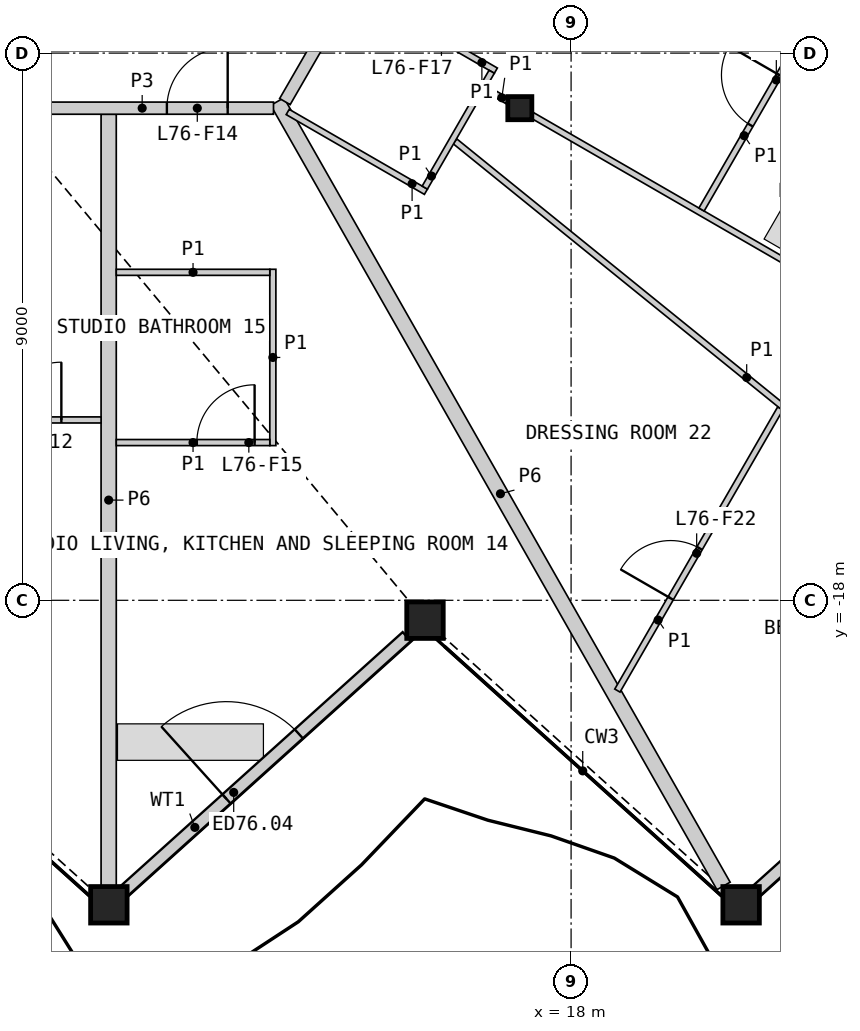
"""IFC4 building model, lengths in metres.
Left out: names, types, materials, properties, quantities, classifications, styles, units other than length and angle.
Written with IfcOpenShell. Run it as: python <this file> out.ifc"""

import sys

from ifc_helpers import new_model, si_unit, direction, frame, frame_2d, origin, origin_2d, place, context, subcontext, project, spatial, rectangle, hollow_rectangle, i_section, extrude, element, fill, save


model = new_model("IFC4")
c1 = context("Model", 3, precision=1e-05, world=origin(), true_north=direction((0.0, 1.0)))
c2 = subcontext(c1, "Body", "Model", "MODEL_VIEW")
j1 = project(units=[si_unit("LENGTHUNIT", "METRE"), si_unit("PLANEANGLEUNIT", "RADIAN")], contexts=[c1])
p1 = place(None, origin())
s1 = spatial("IfcSite", under=j1, at=p1, CompositionType="ELEMENT")
p2 = place(p1, origin())
s2 = spatial("IfcBuilding", under=s1, at=p2, CompositionType="ELEMENT")
p3 = place(p2, frame((0.0, 0.0, 339.2)))
s3 = spatial("IfcBuildingStorey", under=s2, at=p3, CompositionType="ELEMENT", Elevation=339.2)
for number, where, z_axis, x_axis in (
    (1, (10.398, -23.008, 0.0), (0.0, 0.0, 1.0), (1.0, 0.0, 0.0)),
    (2, (15.597, -18.327, 0.0), (0.0, 0.0, 1.0), (1.0, 0.0, 0.0)),
    (3, (20.796, -23.008, 0.0), (0.0, 0.0, 1.0), (1.0, 0.0, 0.0)),
):
    element("IfcColumn", number, at=place(p3, frame(where, z_axis=z_axis, x_axis=x_axis)), inside=s3, PredefinedType="COLUMN", context=c2, shape_type="SweptSolid", body=[
        extrude(hollow_rectangle(XDim=0.6, YDim=0.6, WallThickness=0.04, at=origin_2d()), origin(), (0.0, 0.0, 1.0), 3.4),
    ])
p4 = place(p3, frame((17.157, -9.906, 0.0), z_axis=(0.0, 0.0, 1.0), x_axis=(1.0, 0.0, 0.0)))
e4 = element("IfcColumn", 4, at=p4, inside=s3, PredefinedType="COLUMN", context=c2, shape_type="SweptSolid", body=[
    extrude(i_section(OverallWidth=0.396, OverallDepth=0.381, WebThickness=0.019, FlangeThickness=0.03, at=origin_2d()), origin(), (0.0, 0.0, 1.0), 3.4),
])
p5 = place(p3, frame((10.651, -22.781, 0.0), z_axis=(0.0, 0.0, 1.0), x_axis=(0.743154335217, 0.669120044572, 0.0)))
e5 = element("IfcWall", 5, at=p5, inside=s3, PredefinedType="SOLIDWALL", context=c2, shape_type="SweptSolid", body=[
    extrude(rectangle(XDim=6.252, YDim=0.2, at=frame_2d((3.126, 0.0))), origin(), (0.0, 0.0, 1.0), 2.488),
])
p6 = place(p5, frame((2.263, 0.0, 0.0)))
e6 = element("IfcOpeningElement", 6, at=p6, cuts=e5, PredefinedType="OPENING", context=c2, shape_type="SweptSolid", body=[
    extrude(rectangle(XDim=1.6, YDim=2.25, at=frame_2d((0.8, 1.125))), frame((0.0, 0.11, 0.0), z_axis=(0.0, -1.0, 0.0), x_axis=(1.0, 0.0, 0.0)), (0.0, 0.0, 1.0), 0.22),
])
p7 = place(p3, frame((21.046, -22.781, 0.0), z_axis=(0.0, 0.0, 1.0), x_axis=(0.743154335217, 0.669120044572, 0.0)))
e7 = element("IfcWall", 7, at=p7, inside=s3, PredefinedType="SOLIDWALL", context=c2, shape_type="SweptSolid", body=[
    extrude(rectangle(XDim=6.252, YDim=0.2, at=frame_2d((3.126, 0.0))), origin(), (0.0, 0.0, 1.0), 2.488),
])
p8 = place(p7, frame((2.263, 0.0, 0.0)))
e8 = element("IfcOpeningElement", 8, at=p8, cuts=e7, PredefinedType="OPENING", context=c2, shape_type="SweptSolid", body=[
    extrude(rectangle(XDim=1.6, YDim=2.25, at=frame_2d((0.8, 1.125))), frame((0.0, 0.11, 0.0), z_axis=(0.0, -1.0, 0.0), x_axis=(1.0, 0.0, 0.0)), (0.0, 0.0, 1.0), 0.22),
])
p9 = place(p3, frame((13.169, -9.797, 0.0), z_axis=(0.0, 0.0, 1.0), x_axis=(0.494414335079, -0.869226360201, 0.0)))
e9 = element("IfcWall", 9, at=p9, inside=s3, PredefinedType="PARTITIONING", context=c2, shape_type="SweptSolid", body=[
    extrude(rectangle(XDim=14.842, YDim=0.25, at=frame_2d((7.421, 0.0))), origin(), (0.0, 0.0, 1.0), 2.33),
])
p10 = place(p3, frame((10.395, -22.698, 0.0), z_axis=(0.0, 0.0, 1.0), x_axis=(0.0, 1.0, 0.0)))
e10 = element("IfcWall", 10, at=p10, inside=s3, PredefinedType="PARTITIONING", context=c2, shape_type="SweptSolid", body=[
    extrude(rectangle(XDim=12.692, YDim=0.25, at=frame_2d((6.346, 0.0))), origin(), (0.0, 0.0, 1.0), 2.33),
])
p11 = place(p3, frame((8.786, -9.906, 0.0), z_axis=(0.0, 0.0, 1.0), x_axis=(1.0, 0.0, 0.0)))
e11 = element("IfcWall", 11, at=p11, inside=s3, PredefinedType="PARTITIONING", context=c2, shape_type="SweptSolid", body=[
    extrude(rectangle(XDim=4.32, YDim=0.2, at=frame_2d((2.16, 0.0))), origin(), (0.0, 0.0, 1.0), 3.1),
])
p12 = place(p11, frame((2.566, 0.0, 0.0)))
e12 = element("IfcOpeningElement", 12, at=p12, cuts=e11, PredefinedType="OPENING", context=c2, shape_type="SweptSolid", body=[
    extrude(rectangle(XDim=1.0, YDim=2.1, at=frame_2d((0.5, 1.05))), frame((0.0, 0.11, 0.0), z_axis=(0.0, -1.0, 0.0), x_axis=(1.0, 0.0, 0.0)), (0.0, 0.0, 1.0), 0.22),
])
p13 = place(p3, frame((13.293, -9.797, 0.0), z_axis=(0.0, 0.0, 1.0), x_axis=(0.499967746641, 0.866044024469, 0.0)))
e13 = element("IfcWall", 13, at=p13, inside=s3, PredefinedType="PARTITIONING", context=c2, shape_type="SweptSolid", body=[
    extrude(rectangle(XDim=3.676, YDim=0.2, at=frame_2d((1.838, 0.0))), origin(), (0.0, 0.0, 1.0), 3.1),
])
p14 = place(p13, frame((2.426, 0.0, 0.0)))
e14 = element("IfcOpeningElement", 14, at=p14, cuts=e13, PredefinedType="OPENING", context=c2, shape_type="SweptSolid", body=[
    extrude(rectangle(XDim=1.0, YDim=2.1, at=frame_2d((0.5, 1.05))), frame((0.0, 0.11, 0.0), z_axis=(0.0, -1.0, 0.0), x_axis=(1.0, 0.0, 0.0)), (0.0, 0.0, 1.0), 0.22),
])
p15 = place(p3, frame((16.091, -10.451, 0.0), z_axis=(0.0, 0.0, 1.0), x_axis=(0.77714308631, -0.629323941544, 0.0)))
e15 = element("IfcWall", 15, at=p15, inside=s3, PredefinedType="PARTITIONING", context=c2, shape_type="SweptSolid", body=[
    extrude(rectangle(XDim=12.346, YDim=0.1, at=frame_2d((6.173, 0.0))), origin(), (0.0, 0.0, 1.0), 2.33),
])
p16 = place(p15, frame((7.211, 0.0, 0.0)))
e16 = element("IfcOpeningElement", 16, at=p16, cuts=e15, PredefinedType="OPENING", context=c2, shape_type="SweptSolid", body=[
    extrude(rectangle(XDim=0.95, YDim=2.1, at=frame_2d((0.475, 1.05))), frame((0.0, 0.06, 0.0), z_axis=(0.0, -1.0, 0.0), x_axis=(1.0, 0.0, 0.0)), (0.0, 0.0, 1.0), 0.12),
])
p17 = place(p3, frame((17.365, -10.025, 0.0), z_axis=(0.0, 0.0, 1.0), x_axis=(0.866021046153, -0.500007547564, 0.0)))
e17 = element("IfcWall", 17, at=p17, inside=s3, PredefinedType="PARTITIONING", context=c2, shape_type="SweptSolid", body=[
    extrude(rectangle(XDim=11.267, YDim=0.1, at=frame_2d((5.634, 0.0))), origin(), (0.0, 0.0, 1.0), 2.33),
])
p18 = place(p17, frame((8.264, 0.0, 0.0)))
e18 = element("IfcOpeningElement", 18, at=p18, cuts=e17, PredefinedType="OPENING", context=c2, shape_type="SweptSolid", body=[
    extrude(rectangle(XDim=0.95, YDim=2.1, at=frame_2d((0.475, 1.05))), frame((0.0, 0.06, 0.0), z_axis=(0.0, -1.0, 0.0), x_axis=(1.0, 0.0, 0.0)), (0.0, 0.0, 1.0), 0.12),
])
p19 = place(p3, frame((0.05, -15.033, 0.0), z_axis=(0.0, 0.0, 1.0), x_axis=(1.0, 0.0, 0.0)))
e19 = element("IfcWall", 19, at=p19, inside=s3, PredefinedType="PARTITIONING", context=c2, shape_type="SweptSolid", body=[
    extrude(rectangle(XDim=10.22, YDim=0.1, at=frame_2d((5.11, 0.0))), origin(), (0.0, 0.0, 1.0), 2.33),
])
p20 = place(p19, frame((0.855, 0.0, 0.0)))
e20 = element("IfcOpeningElement", 20, at=p20, cuts=e19, PredefinedType="OPENING", context=c2, shape_type="SweptSolid", body=[
    extrude(rectangle(XDim=0.95, YDim=2.1, at=frame_2d((0.475, 1.05))), frame((0.0, 0.06, 0.0), z_axis=(0.0, -1.0, 0.0), x_axis=(1.0, 0.0, 0.0)), (0.0, 0.0, 1.0), 0.12),
])
p21 = place(p19, frame((8.617, 0.0, 0.0)))
e21 = element("IfcOpeningElement", 21, at=p21, cuts=e19, PredefinedType="OPENING", context=c2, shape_type="SweptSolid", body=[
    extrude(rectangle(XDim=0.95, YDim=2.1, at=frame_2d((0.475, 1.05))), frame((0.0, 0.06, 0.0), z_axis=(0.0, -1.0, 0.0), x_axis=(1.0, 0.0, 0.0)), (0.0, 0.0, 1.0), 0.12),
])
p22 = place(p3, frame((18.761, -19.485, 0.0), z_axis=(0.0, 0.0, 1.0), x_axis=(0.500031527488, 0.866007200615, 0.0)))
e22 = element("IfcWall", 22, at=p22, inside=s3, PredefinedType="PARTITIONING", context=c2, shape_type="SweptSolid", body=[
    extrude(rectangle(XDim=5.356, YDim=0.1, at=frame_2d((2.678, 0.0))), origin(), (0.0, 0.0, 1.0), 2.33),
])
p23 = place(p22, frame((1.752, 0.0, 0.0)))
e23 = element("IfcOpeningElement", 23, at=p23, cuts=e22, PredefinedType="OPENING", context=c2, shape_type="SweptSolid", body=[
    extrude(rectangle(XDim=0.95, YDim=2.1, at=frame_2d((0.475, 1.05))), frame((0.0, 0.06, 0.0), z_axis=(0.0, -1.0, 0.0), x_axis=(1.0, 0.0, 0.0)), (0.0, 0.0, 1.0), 0.12),
])
p24 = place(p3, frame((20.145, -11.573, 0.0), z_axis=(0.0, 0.0, 1.0), x_axis=(0.49998612769, 0.866033412818, 0.0)))
e24 = element("IfcWall", 24, at=p24, inside=s3, PredefinedType="PARTITIONING", context=c2, shape_type="SweptSolid", body=[
    extrude(rectangle(XDim=2.805, YDim=0.1, at=frame_2d((1.403, 0.0))), origin(), (0.0, 0.0, 1.0), 2.33),
])
p25 = place(p24, frame((1.605, 0.0, 0.0)))
e25 = element("IfcOpeningElement", 25, at=p25, cuts=e24, PredefinedType="OPENING", context=c2, shape_type="SweptSolid", body=[
    extrude(rectangle(XDim=0.95, YDim=2.1, at=frame_2d((0.475, 1.05))), frame((0.0, 0.06, 0.0), z_axis=(0.0, -1.0, 0.0), x_axis=(1.0, 0.0, 0.0)), (0.0, 0.0, 1.0), 0.12),
])
p26 = place(p3, frame((13.095, -15.456, 0.0), z_axis=(0.0, 0.0, 1.0), x_axis=(0.0, 1.0, 0.0)))
e26 = element("IfcWall", 26, at=p26, inside=s3, PredefinedType="PARTITIONING", context=c2, shape_type="SweptSolid", body=[
    extrude(rectangle(XDim=2.9, YDim=0.1, at=frame_2d((1.45, 0.0))), origin(), (0.0, 0.0, 1.0), 2.33),
])
p27 = place(p3, frame((10.52, -12.606, 0.0), z_axis=(0.0, 0.0, 1.0), x_axis=(1.0, 0.0, 0.0)))
e27 = element("IfcWall", 27, at=p27, inside=s3, PredefinedType="PARTITIONING", context=c2, shape_type="SweptSolid", body=[
    extrude(rectangle(XDim=2.525, YDim=0.1, at=frame_2d((1.263, 0.0))), origin(), (0.0, 0.0, 1.0), 2.33),
])
p28 = place(p3, frame((10.52, -15.406, 0.0), z_axis=(0.0, 0.0, 1.0), x_axis=(1.0, 0.0, 0.0)))
e28 = element("IfcWall", 28, at=p28, inside=s3, PredefinedType="PARTITIONING", context=c2, shape_type="SweptSolid", body=[
    extrude(rectangle(XDim=2.525, YDim=0.1, at=frame_2d((1.263, 0.0))), origin(), (0.0, 0.0, 1.0), 2.33),
])
p29 = place(p28, frame((1.325, 0.0, 0.0)))
e29 = element("IfcOpeningElement", 29, at=p29, cuts=e28, PredefinedType="OPENING", context=c2, shape_type="SweptSolid", body=[
    extrude(rectangle(XDim=0.95, YDim=2.1, at=frame_2d((0.475, 1.05))), frame((0.0, 0.06, 0.0), z_axis=(0.0, -1.0, 0.0), x_axis=(1.0, 0.0, 0.0)), (0.0, 0.0, 1.0), 0.12),
])
p30 = place(p3, frame((14.468, -7.964, 0.0), z_axis=(0.0, 0.0, 1.0), x_axis=(0.865989200783, -0.500062700197, 0.0)))
e30 = element("IfcWall", 30, at=p30, inside=s3, PredefinedType="PARTITIONING", context=c2, shape_type="SweptSolid", body=[
    extrude(rectangle(XDim=2.65, YDim=0.1, at=frame_2d((1.325, 0.0))), origin(), (0.0, 0.0, 1.0), 2.33),
])
p31 = place(p30, frame((0.905, 0.0, 0.0)))
e31 = element("IfcOpeningElement", 31, at=p31, cuts=e30, PredefinedType="OPENING", context=c2, shape_type="SweptSolid", body=[
    extrude(rectangle(XDim=0.95, YDim=2.1, at=frame_2d((0.475, 1.05))), frame((0.0, 0.06, 0.0), z_axis=(0.0, -1.0, 0.0), x_axis=(1.0, 0.0, 0.0)), (0.0, 0.0, 1.0), 0.12),
])
p32 = place(p3, frame((13.339, -9.968, 0.0), z_axis=(0.0, 0.0, 1.0), x_axis=(0.866036909293, -0.499980071345, 0.0)))
e32 = element("IfcWall", 32, at=p32, inside=s3, PredefinedType="PARTITIONING", context=c2, shape_type="SweptSolid", body=[
    extrude(rectangle(XDim=2.625, YDim=0.1, at=frame_2d((1.312, 0.0))), origin(), (0.0, 0.0, 1.0), 2.33),
])
p33 = place(p3, frame((15.594, -11.212, 0.0), z_axis=(0.0, 0.0, 1.0), x_axis=(0.499898558967, 0.866083962871, 0.0)))
e33 = element("IfcWall", 33, at=p33, inside=s3, PredefinedType="PARTITIONING", context=c2, shape_type="SweptSolid", body=[
    extrude(rectangle(XDim=2.2, YDim=0.1, at=frame_2d((1.1, 0.0))), origin(), (0.0, 0.0, 1.0), 2.33),
])
p34 = place(p3, frame((16.594, -9.581, 0.0), z_axis=(0.0, 0.0, 1.0), x_axis=(0.866036909293, -0.499980071345, 0.0)))
e34 = element("IfcWall", 34, at=p34, inside=s3, PredefinedType="PARTITIONING", context=c2, shape_type="SweptSolid", body=[
    extrude(rectangle(XDim=0.41, YDim=0.1, at=frame_2d((0.205, 0.0))), origin(), (0.0, 0.0, 1.0), 2.33),
])
p35 = place(p6, origin())
e35 = element("IfcDoor", 35, at=p35, inside=s3, OperationType="DOUBLE_DOOR_SINGLE_SWING", PredefinedType="DOOR", context=c2, shape_type="SweptSolid", body=[
    extrude(rectangle(XDim=1.6, YDim=2.25, at=frame_2d((0.8, 1.125))), frame((0.0, 0.025, 0.0), z_axis=(0.0, -1.0, 0.0), x_axis=(1.0, 0.0, 0.0)), (0.0, 0.0, 1.0), 0.05),
])
fill(e6, e35)
p36 = place(p21, origin())
e36 = element("IfcDoor", 36, at=p36, inside=s3, OperationType="SINGLE_SWING_RIGHT", PredefinedType="DOOR", context=c2, shape_type="SweptSolid", body=[
    extrude(rectangle(XDim=0.95, YDim=2.1, at=frame_2d((0.475, 1.05))), frame((0.0, 0.025, 0.0), z_axis=(0.0, -1.0, 0.0), x_axis=(1.0, 0.0, 0.0)), (0.0, 0.0, 1.0), 0.05),
])
fill(e21, e36)
p37 = place(p12, origin())
e37 = element("IfcDoor", 37, at=p37, inside=s3, OperationType="SINGLE_SWING_RIGHT", PredefinedType="DOOR", context=c2, shape_type="SweptSolid", body=[
    extrude(rectangle(XDim=1.0, YDim=2.1, at=frame_2d((0.5, 1.05))), frame((0.0, 0.025, 0.0), z_axis=(0.0, -1.0, 0.0), x_axis=(1.0, 0.0, 0.0)), (0.0, 0.0, 1.0), 0.05),
])
fill(e12, e37)
p38 = place(p29, origin())
e38 = element("IfcDoor", 38, at=p38, inside=s3, OperationType="SINGLE_SWING_RIGHT", PredefinedType="DOOR", context=c2, shape_type="SweptSolid", body=[
    extrude(rectangle(XDim=0.95, YDim=2.1, at=frame_2d((0.475, 1.05))), frame((0.0, 0.025, 0.0), z_axis=(0.0, -1.0, 0.0), x_axis=(1.0, 0.0, 0.0)), (0.0, 0.0, 1.0), 0.05),
])
fill(e29, e38)
p39 = place(p25, origin())
e39 = element("IfcDoor", 39, at=p39, inside=s3, OperationType="SINGLE_SWING_RIGHT", PredefinedType="DOOR", context=c2, shape_type="SweptSolid", body=[
    extrude(rectangle(XDim=0.95, YDim=2.1, at=frame_2d((0.475, 1.05))), frame((0.0, 0.025, 0.0), z_axis=(0.0, -1.0, 0.0), x_axis=(1.0, 0.0, 0.0)), (0.0, 0.0, 1.0), 0.05),
])
fill(e25, e39)
p40 = place(p23, origin())
e40 = element("IfcDoor", 40, at=p40, inside=s3, OperationType="SINGLE_SWING_LEFT", PredefinedType="DOOR", context=c2, shape_type="SweptSolid", body=[
    extrude(rectangle(XDim=0.95, YDim=2.1, at=frame_2d((0.475, 1.05))), frame((0.0, 0.025, 0.0), z_axis=(0.0, -1.0, 0.0), x_axis=(1.0, 0.0, 0.0)), (0.0, 0.0, 1.0), 0.05),
])
fill(e23, e40)
save(model, sys.argv[1])
